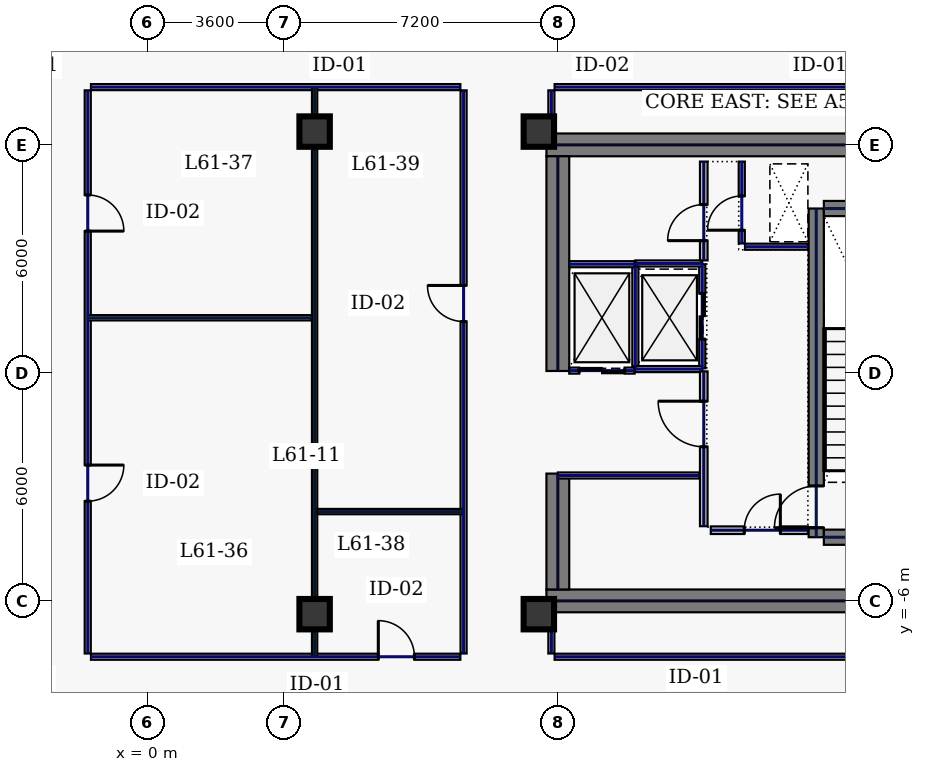
"""IFC4 building model, lengths in metres.
Left out: names, types, materials, properties, quantities, classifications, styles, units other than length and angle.
Written with IfcOpenShell. Run it as: python <this file> out.ifc"""

import sys

from ifc_helpers import new_model, si_unit, direction, frame, frame_2d, origin, origin_2d, place, context, subcontext, project, spatial, rectangle, hollow_rectangle, extrude, element, fill, save


model = new_model("IFC4")
c1 = context("Model", 3, precision=1e-05, world=origin(), true_north=direction((0.0, 1.0)))
c2 = subcontext(c1, "Body", "Model", "MODEL_VIEW")
j1 = project(units=[si_unit("LENGTHUNIT", "METRE"), si_unit("PLANEANGLEUNIT", "RADIAN")], contexts=[c1])
p1 = place(None, origin())
s1 = spatial("IfcSite", under=j1, at=p1, CompositionType="ELEMENT")
p2 = place(p1, origin())
s2 = spatial("IfcBuilding", under=s1, at=p2, CompositionType="ELEMENT")
p3 = place(p2, frame((0.0, 0.0, 263.0)))
s3 = spatial("IfcBuildingStorey", under=s2, at=p3, CompositionType="ELEMENT", Elevation=263.0)
for number, where, z_axis, x_axis in (
    (1, (10.5, 6.0, 0.0), (0.0, 0.0, 1.0), (1.0, 0.0, 0.0)),
    (2, (10.5, -6.0, 0.0), (0.0, 0.0, 1.0), (1.0, 0.0, 0.0)),
):
    element("IfcWall", number, at=place(p3, frame(where, z_axis=z_axis, x_axis=x_axis)), inside=s3, PredefinedType="SHEAR", context=c2, shape_type="SweptSolid", body=[
        extrude(rectangle(XDim=11.5, YDim=0.6, at=frame_2d((5.75, 0.0))), origin(), (0.0, 0.0, 1.0), 3.74),
    ])
p4 = place(p3, frame((10.8, -5.7, 0.0), z_axis=(0.0, 0.0, 1.0), x_axis=(0.0, 1.0, 0.0)))
e3 = element("IfcWall", 3, at=p4, inside=s3, PredefinedType="SHEAR", context=c2, shape_type="SweptSolid", body=[
    extrude(rectangle(XDim=3.05, YDim=0.6, at=frame_2d((1.525, 0.0))), origin(), (0.0, 0.0, 1.0), 3.74),
])
p5 = place(p3, frame((10.8, 0.05, 0.0), z_axis=(0.0, 0.0, 1.0), x_axis=(0.0, 1.0, 0.0)))
e4 = element("IfcWall", 4, at=p5, inside=s3, PredefinedType="SHEAR", context=c2, shape_type="SweptSolid", body=[
    extrude(rectangle(XDim=5.65, YDim=0.6, at=frame_2d((2.825, 0.0))), origin(), (0.0, 0.0, 1.0), 3.74),
])
p6 = place(p3, frame((17.6, -4.325, 0.0), z_axis=(0.0, 0.0, 1.0), x_axis=(0.0, 1.0, 0.0)))
e5 = element("IfcWall", 5, at=p6, inside=s3, PredefinedType="SHEAR", context=c2, shape_type="SweptSolid", body=[
    extrude(rectangle(XDim=8.65, YDim=0.4, at=frame_2d((4.325, 0.0))), origin(), (0.0, 0.0, 1.0), 3.74),
])
p7 = place(p6, frame((0.25, 0.0, 0.0)))
e6 = element("IfcOpeningElement", 6, at=p7, cuts=e5, PredefinedType="OPENING", context=c2, shape_type="SweptSolid", body=[
    extrude(rectangle(XDim=1.1, YDim=2.2, at=frame_2d((0.55, 1.1))), frame((0.0, 0.21, 0.0), z_axis=(0.0, -1.0, 0.0), x_axis=(1.0, 0.0, 0.0)), (0.0, 0.0, 1.0), 0.42),
])
for number, where, z_axis, x_axis in (
    (7, (17.8, -4.325, 0.0), (0.0, 0.0, 1.0), (1.0, 0.0, 0.0)),
    (8, (17.8, 4.325, 0.0), (0.0, 0.0, 1.0), (1.0, 0.0, 0.0)),
):
    element("IfcWall", number, at=place(p3, frame(where, z_axis=z_axis, x_axis=x_axis)), inside=s3, PredefinedType="SHEAR", context=c2, shape_type="SweptSolid", body=[
        extrude(rectangle(XDim=3.4, YDim=0.4, at=frame_2d((1.7, 0.0))), origin(), (0.0, 0.0, 1.0), 3.74),
    ])
for number, where, z_axis, x_axis in (
    (9, (10.3, -6.35, 0.0), (0.0, 0.0, 1.0), (1.0, 0.0, 0.0)),
    (10, (10.3, 6.35, 0.0), (0.0, 0.0, 1.0), (1.0, 0.0, 0.0)),
    (11, (4.4, -6.35, 0.0), (0.0, 0.0, 1.0), (1.0, 0.0, 0.0)),
    (12, (4.4, 6.35, 0.0), (0.0, 0.0, 1.0), (1.0, 0.0, 0.0)),
):
    element("IfcColumn", number, at=place(p3, frame(where, z_axis=z_axis, x_axis=x_axis)), inside=s3, PredefinedType="COLUMN", context=c2, shape_type="SweptSolid", body=[
        extrude(hollow_rectangle(XDim=0.8, YDim=0.8, WallThickness=0.036, at=origin_2d()), origin(), (0.0, 0.0, 1.0), 3.74),
    ])
p8 = place(p3, frame((14.6, 0.12, 0.0), z_axis=(0.0, 0.0, 1.0), x_axis=(0.0, 1.0, 0.0)))
e13 = element("IfcWall", 13, at=p8, inside=s3, PredefinedType="PARTITIONING", context=c2, shape_type="SweptSolid", body=[
    extrude(rectangle(XDim=2.74, YDim=0.16, at=frame_2d((1.37, 0.0))), origin(), (0.0, 0.0, 1.0), 3.74),
])
p9 = place(p8, frame((0.77, 0.0, 0.0)))
e14 = element("IfcOpeningElement", 14, at=p9, cuts=e13, PredefinedType="OPENING", context=c2, shape_type="SweptSolid", body=[
    extrude(rectangle(XDim=1.2, YDim=2.2, at=frame_2d((0.6, 1.1))), frame((0.0, 0.09, 0.0), z_axis=(0.0, -1.0, 0.0), x_axis=(1.0, 0.0, 0.0)), (0.0, 0.0, 1.0), 0.18),
])
for number, where, z_axis, x_axis in (
    (15, (12.84, 0.1, 0.0), (0.0, 0.0, 1.0), (1.0, 0.0, 0.0)),
    (16, (12.84, 2.88, 0.0), (0.0, 0.0, 1.0), (1.0, 0.0, 0.0)),
):
    element("IfcWall", number, at=place(p3, frame(where, z_axis=z_axis, x_axis=x_axis)), inside=s3, PredefinedType="PARTITIONING", context=c2, shape_type="SweptSolid", body=[
        extrude(rectangle(XDim=1.76, YDim=0.16, at=frame_2d((0.88, 0.0))), origin(), (0.0, 0.0, 1.0), 3.74),
    ])
p10 = place(p3, frame((12.84, 0.18, 0.0), z_axis=(0.0, 0.0, 1.0), x_axis=(0.0, 1.0, 0.0)))
e17 = element("IfcWall", 17, at=p10, inside=s3, PredefinedType="PARTITIONING", context=c2, shape_type="SweptSolid", body=[
    extrude(rectangle(XDim=2.62, YDim=0.16, at=frame_2d((1.31, 0.0))), origin(), (0.0, 0.0, 1.0), 3.74),
])
p11 = place(p3, frame((11.1, 0.06, 0.0), z_axis=(0.0, 0.0, 1.0), x_axis=(1.0, 0.0, 0.0)))
e18 = element("IfcWall", 18, at=p11, inside=s3, PredefinedType="PARTITIONING", context=c2, shape_type="SweptSolid", body=[
    extrude(rectangle(XDim=1.72, YDim=0.16, at=frame_2d((0.86, 0.0))), origin(), (0.0, 0.0, 1.0), 3.74),
])
p12 = place(p11, frame((0.26, 0.0, 0.0)))
e19 = element("IfcOpeningElement", 19, at=p12, cuts=e18, PredefinedType="OPENING", context=c2, shape_type="SweptSolid", body=[
    extrude(rectangle(XDim=1.2, YDim=2.2, at=frame_2d((0.6, 1.1))), frame((0.0, 0.09, 0.0), z_axis=(0.0, -1.0, 0.0), x_axis=(1.0, 0.0, 0.0)), (0.0, 0.0, 1.0), 0.18),
])
p13 = place(p3, frame((11.1, 2.86, 0.0), z_axis=(0.0, 0.0, 1.0), x_axis=(1.0, 0.0, 0.0)))
e20 = element("IfcWall", 20, at=p13, inside=s3, PredefinedType="PARTITIONING", context=c2, shape_type="SweptSolid", body=[
    extrude(rectangle(XDim=1.72, YDim=0.16, at=frame_2d((0.86, 0.0))), origin(), (0.0, 0.0, 1.0), 3.74),
])
p14 = place(p3, frame((15.64, 3.405, 0.0), z_axis=(0.0, 0.0, 1.0), x_axis=(0.0, 1.0, 0.0)))
e21 = element("IfcWall", 21, at=p14, inside=s3, PredefinedType="PARTITIONING", context=c2, shape_type="SweptSolid", body=[
    extrude(rectangle(XDim=2.155, YDim=0.16, at=frame_2d((1.078, 0.0))), origin(), (0.0, 0.0, 1.0), 3.74),
])
p15 = place(p14, frame((0.35, 0.0, 0.0)))
e22 = element("IfcOpeningElement", 22, at=p15, cuts=e21, PredefinedType="OPENING", context=c2, shape_type="SweptSolid", body=[
    extrude(rectangle(XDim=0.9, YDim=2.2, at=frame_2d((0.45, 1.1))), frame((0.0, 0.09, 0.0), z_axis=(0.0, -1.0, 0.0), x_axis=(1.0, 0.0, 0.0)), (0.0, 0.0, 1.0), 0.18),
])
p16 = place(p3, frame((15.725, 3.32, 0.0), z_axis=(0.0, 0.0, 1.0), x_axis=(1.0, 0.0, 0.0)))
e23 = element("IfcWall", 23, at=p16, inside=s3, PredefinedType="PARTITIONING", context=c2, shape_type="SweptSolid", body=[
    extrude(rectangle(XDim=1.655, YDim=0.16, at=frame_2d((0.827, 0.0))), origin(), (0.0, 0.0, 1.0), 3.74),
])
p17 = place(p3, frame((14.825, -4.14, 0.0), z_axis=(0.0, 0.0, 1.0), x_axis=(1.0, 0.0, 0.0)))
e24 = element("IfcWall", 24, at=p17, inside=s3, PredefinedType="SOLIDWALL", context=c2, shape_type="SweptSolid", body=[
    extrude(rectangle(XDim=2.555, YDim=0.2, at=frame_2d((1.277, 0.0))), origin(), (0.0, 0.0, 1.0), 3.74),
])
p18 = place(p17, frame((0.88, 0.0, 0.0)))
e25 = element("IfcOpeningElement", 25, at=p18, cuts=e24, PredefinedType="OPENING", context=c2, shape_type="SweptSolid", body=[
    extrude(rectangle(XDim=0.95, YDim=2.2, at=frame_2d((0.475, 1.1))), frame((0.0, 0.11, 0.0), z_axis=(0.0, -1.0, 0.0), x_axis=(1.0, 0.0, 0.0)), (0.0, 0.0, 1.0), 0.22),
])
p19 = place(p3, frame((10.8, -2.7, 0.0), z_axis=(0.0, 0.0, 1.0), x_axis=(1.0, 0.0, 0.0)))
e26 = element("IfcWall", 26, at=p19, inside=s3, PredefinedType="PARTITIONING", context=c2, shape_type="SweptSolid", body=[
    extrude(rectangle(XDim=3.735, YDim=0.16, at=frame_2d((1.867, 0.0))), origin(), (0.0, 0.0, 1.0), 3.74),
])
p20 = place(p3, frame((14.64, 2.96, 0.0), z_axis=(0.0, 0.0, 1.0), x_axis=(0.0, 1.0, 0.0)))
e27 = element("IfcWall", 27, at=p20, inside=s3, PredefinedType="SOLIDWALL", context=c2, shape_type="SweptSolid", body=[
    extrude(rectangle(XDim=2.6, YDim=0.2, at=frame_2d((1.3, 0.0))), origin(), (0.0, 0.0, 1.0), 3.74),
])
p21 = place(p20, frame((0.52, 0.0, 0.0)))
e28 = element("IfcOpeningElement", 28, at=p21, cuts=e27, PredefinedType="OPENING", context=c2, shape_type="SweptSolid", body=[
    extrude(rectangle(XDim=0.95, YDim=2.2, at=frame_2d((0.475, 1.1))), frame((0.0, 0.11, 0.0), z_axis=(0.0, -1.0, 0.0), x_axis=(1.0, 0.0, 0.0)), (0.0, 0.0, 1.0), 0.22),
])
p22 = place(p3, frame((14.64, -4.035, 0.0), z_axis=(0.0, 0.0, 1.0), x_axis=(0.0, 1.0, 0.0)))
e29 = element("IfcWall", 29, at=p22, inside=s3, PredefinedType="SOLIDWALL", context=c2, shape_type="SweptSolid", body=[
    extrude(rectangle(XDim=4.075, YDim=0.2, at=frame_2d((2.038, 0.0))), origin(), (0.0, 0.0, 1.0), 3.74),
])
p23 = place(p22, frame((2.09, 0.0, 0.0)))
e30 = element("IfcOpeningElement", 30, at=p23, cuts=e29, PredefinedType="OPENING", context=c2, shape_type="SweptSolid", body=[
    extrude(rectangle(XDim=1.2, YDim=2.2, at=frame_2d((0.6, 1.1))), frame((0.0, 0.11, 0.0), z_axis=(0.0, -1.0, 0.0), x_axis=(1.0, 0.0, 0.0)), (0.0, 0.0, 1.0), 0.22),
])
p24 = place(p3, frame((22.585, 7.52, 0.0), z_axis=(0.0, 0.0, 1.0), x_axis=(-1.0, 0.0, 0.0)))
e31 = element("IfcWall", 31, at=p24, inside=s3, PredefinedType="PARTITIONING", context=c2, shape_type="SweptSolid", body=[
    extrude(rectangle(XDim=11.87, YDim=0.16, at=frame_2d((5.935, 0.0))), origin(), (0.0, 0.0, 1.0), 3.74),
])
p25 = place(p3, frame((10.63, 7.435, 0.0), z_axis=(0.0, 0.0, 1.0), x_axis=(0.0, -1.0, 0.0)))
e32 = element("IfcWall", 32, at=p25, inside=s3, PredefinedType="PARTITIONING", context=c2, shape_type="SweptSolid", body=[
    extrude(rectangle(XDim=1.015, YDim=0.16, at=frame_2d((0.508, 0.0))), origin(), (0.0, 0.0, 1.0), 3.74),
])
p26 = place(p3, frame((10.63, -6.42, 0.0), z_axis=(0.0, 0.0, 1.0), x_axis=(0.0, -1.0, 0.0)))
e33 = element("IfcWall", 33, at=p26, inside=s3, PredefinedType="PARTITIONING", context=c2, shape_type="SweptSolid", body=[
    extrude(rectangle(XDim=0.965, YDim=0.16, at=frame_2d((0.482, 0.0))), origin(), (0.0, 0.0, 1.0), 3.74),
])
p27 = place(p3, frame((10.715, -7.47, 0.0), z_axis=(0.0, 0.0, 1.0), x_axis=(1.0, 0.0, 0.0)))
e34 = element("IfcWall", 34, at=p27, inside=s3, PredefinedType="PARTITIONING", context=c2, shape_type="SweptSolid", body=[
    extrude(rectangle(XDim=11.87, YDim=0.16, at=frame_2d((5.935, 0.0))), origin(), (0.0, 0.0, 1.0), 3.74),
])
p28 = place(p3, frame((8.235, 7.52, 0.0), z_axis=(0.0, 0.0, 1.0), x_axis=(-1.0, 0.0, 0.0)))
e35 = element("IfcWall", 35, at=p28, inside=s3, PredefinedType="PARTITIONING", context=c2, shape_type="SweptSolid", body=[
    extrude(rectangle(XDim=9.72, YDim=0.16, at=frame_2d((4.86, 0.0))), origin(), (0.0, 0.0, 1.0), 3.74),
])
p29 = place(p3, frame((-1.57, 7.435, 0.0), z_axis=(0.0, 0.0, 1.0), x_axis=(0.0, -1.0, 0.0)))
e36 = element("IfcWall", 36, at=p29, inside=s3, PredefinedType="PARTITIONING", context=c2, shape_type="SweptSolid", body=[
    extrude(rectangle(XDim=14.82, YDim=0.16, at=frame_2d((7.41, 0.0))), origin(), (0.0, 0.0, 1.0), 3.74),
])
p30 = place(p29, frame((9.861, 0.0, 0.0)))
e37 = element("IfcOpeningElement", 37, at=p30, cuts=e36, PredefinedType="OPENING", context=c2, shape_type="SweptSolid", body=[
    extrude(rectangle(XDim=0.95, YDim=2.2, at=frame_2d((0.475, 1.1))), frame((0.0, 0.09, 0.0), z_axis=(0.0, -1.0, 0.0), x_axis=(1.0, 0.0, 0.0)), (0.0, 0.0, 1.0), 0.18),
])
p31 = place(p29, frame((2.754, 0.0, 0.0)))
e38 = element("IfcOpeningElement", 38, at=p31, cuts=e36, PredefinedType="OPENING", context=c2, shape_type="SweptSolid", body=[
    extrude(rectangle(XDim=0.95, YDim=2.2, at=frame_2d((0.475, 1.1))), frame((0.0, 0.09, 0.0), z_axis=(0.0, -1.0, 0.0), x_axis=(1.0, 0.0, 0.0)), (0.0, 0.0, 1.0), 0.18),
])
p32 = place(p3, frame((-1.485, -7.47, 0.0), z_axis=(0.0, 0.0, 1.0), x_axis=(1.0, 0.0, 0.0)))
e39 = element("IfcWall", 39, at=p32, inside=s3, PredefinedType="PARTITIONING", context=c2, shape_type="SweptSolid", body=[
    extrude(rectangle(XDim=9.72, YDim=0.16, at=frame_2d((4.86, 0.0))), origin(), (0.0, 0.0, 1.0), 3.74),
])
p33 = place(p32, frame((7.561, 0.0, 0.0)))
e40 = element("IfcOpeningElement", 40, at=p33, cuts=e39, PredefinedType="OPENING", context=c2, shape_type="SweptSolid", body=[
    extrude(rectangle(XDim=0.95, YDim=2.2, at=frame_2d((0.475, 1.1))), frame((0.0, 0.09, 0.0), z_axis=(0.0, -1.0, 0.0), x_axis=(1.0, 0.0, 0.0)), (0.0, 0.0, 1.0), 0.18),
])
p34 = place(p3, frame((8.32, -7.385, 0.0), z_axis=(0.0, 0.0, 1.0), x_axis=(0.0, 1.0, 0.0)))
e41 = element("IfcWall", 41, at=p34, inside=s3, PredefinedType="PARTITIONING", context=c2, shape_type="SweptSolid", body=[
    extrude(rectangle(XDim=14.82, YDim=0.16, at=frame_2d((7.41, 0.0))), origin(), (0.0, 0.0, 1.0), 3.74),
])
p35 = place(p34, frame((8.736, 0.0, 0.0)))
e42 = element("IfcOpeningElement", 42, at=p35, cuts=e41, PredefinedType="OPENING", context=c2, shape_type="SweptSolid", body=[
    extrude(rectangle(XDim=0.95, YDim=2.2, at=frame_2d((0.475, 1.1))), frame((0.0, 0.09, 0.0), z_axis=(0.0, -1.0, 0.0), x_axis=(1.0, 0.0, 0.0)), (0.0, 0.0, 1.0), 0.18),
])
p36 = place(p3, frame((4.4, -7.465, 0.0), z_axis=(0.0, 0.0, 1.0), x_axis=(0.0, 1.0, 0.0)))
e43 = element("IfcWall", 43, at=p36, inside=s3, PredefinedType="PARTITIONING", context=c2, shape_type="SweptSolid", body=[
    extrude(rectangle(XDim=14.98, YDim=0.14, at=frame_2d((7.49, 0.0))), origin(), (0.0, 0.0, 1.0), 3.035),
])
p37 = place(p3, frame((-1.565, 1.45, 0.0), z_axis=(0.0, 0.0, 1.0), x_axis=(1.0, 0.0, 0.0)))
e44 = element("IfcWall", 44, at=p37, inside=s3, PredefinedType="PARTITIONING", context=c2, shape_type="SweptSolid", body=[
    extrude(rectangle(XDim=5.89, YDim=0.14, at=frame_2d((2.945, 0.0))), origin(), (0.0, 0.0, 1.0), 3.74),
])
p38 = place(p3, frame((4.475, -3.65, 0.0), z_axis=(0.0, 0.0, 1.0), x_axis=(1.0, 0.0, 0.0)))
e45 = element("IfcWall", 45, at=p38, inside=s3, PredefinedType="PARTITIONING", context=c2, shape_type="SweptSolid", body=[
    extrude(rectangle(XDim=3.84, YDim=0.14, at=frame_2d((1.92, 0.0))), origin(), (0.0, 0.0, 1.0), 3.74),
])
p39 = place(p7, origin())
e46 = element("IfcDoor", 46, at=p39, inside=s3, OperationType="SINGLE_SWING_LEFT", PredefinedType="DOOR", context=c2, shape_type="SweptSolid", body=[
    extrude(rectangle(XDim=1.1, YDim=2.2, at=frame_2d((0.55, 1.1))), frame((0.0, 0.025, 0.0), z_axis=(0.0, -1.0, 0.0), x_axis=(1.0, 0.0, 0.0)), (0.0, 0.0, 1.0), 0.05),
])
fill(e6, e46)
p40 = place(p9, origin())
e47 = element("IfcDoor", 47, at=p40, inside=s3, OperationType="SLIDING_TO_LEFT", PredefinedType="DOOR", context=c2, shape_type="SweptSolid", body=[
    extrude(rectangle(XDim=1.2, YDim=2.2, at=frame_2d((0.6, 1.1))), frame((0.0, 0.025, 0.0), z_axis=(0.0, -1.0, 0.0), x_axis=(1.0, 0.0, 0.0)), (0.0, 0.0, 1.0), 0.05),
])
fill(e14, e47)
p41 = place(p12, origin())
e48 = element("IfcDoor", 48, at=p41, inside=s3, OperationType="SLIDING_TO_LEFT", PredefinedType="DOOR", context=c2, shape_type="SweptSolid", body=[
    extrude(rectangle(XDim=1.2, YDim=2.2, at=frame_2d((0.6, 1.1))), frame((0.0, 0.025, 0.0), z_axis=(0.0, -1.0, 0.0), x_axis=(1.0, 0.0, 0.0)), (0.0, 0.0, 1.0), 0.05),
])
fill(e19, e48)
p42 = place(p15, origin())
e49 = element("IfcDoor", 49, at=p42, inside=s3, OperationType="SINGLE_SWING_LEFT", PredefinedType="DOOR", context=c2, shape_type="SweptSolid", body=[
    extrude(rectangle(XDim=0.9, YDim=2.2, at=frame_2d((0.45, 1.1))), frame((0.0, 0.025, 0.0), z_axis=(0.0, -1.0, 0.0), x_axis=(1.0, 0.0, 0.0)), (0.0, 0.0, 1.0), 0.05),
])
fill(e22, e49)
p43 = place(p18, origin())
e50 = element("IfcDoor", 50, at=p43, inside=s3, OperationType="SINGLE_SWING_RIGHT", PredefinedType="DOOR", context=c2, shape_type="SweptSolid", body=[
    extrude(rectangle(XDim=0.95, YDim=2.2, at=frame_2d((0.475, 1.1))), frame((0.0, 0.025, 0.0), z_axis=(0.0, -1.0, 0.0), x_axis=(1.0, 0.0, 0.0)), (0.0, 0.0, 1.0), 0.05),
])
fill(e25, e50)
p44 = place(p21, origin())
e51 = element("IfcDoor", 51, at=p44, inside=s3, OperationType="SINGLE_SWING_LEFT", PredefinedType="DOOR", context=c2, shape_type="SweptSolid", body=[
    extrude(rectangle(XDim=0.95, YDim=2.2, at=frame_2d((0.475, 1.1))), frame((0.0, 0.025, 0.0), z_axis=(0.0, -1.0, 0.0), x_axis=(1.0, 0.0, 0.0)), (0.0, 0.0, 1.0), 0.05),
])
fill(e28, e51)
p45 = place(p23, origin())
e52 = element("IfcDoor", 52, at=p45, inside=s3, OperationType="SINGLE_SWING_RIGHT", PredefinedType="DOOR", context=c2, shape_type="SweptSolid", body=[
    extrude(rectangle(XDim=1.2, YDim=2.2, at=frame_2d((0.6, 1.1))), frame((0.0, 0.025, 0.0), z_axis=(0.0, -1.0, 0.0), x_axis=(1.0, 0.0, 0.0)), (0.0, 0.0, 1.0), 0.05),
])
fill(e30, e52)
p46 = place(p30, origin())
e53 = element("IfcDoor", 53, at=p46, inside=s3, OperationType="SINGLE_SWING_LEFT", PredefinedType="DOOR", context=c2, shape_type="SweptSolid", body=[
    extrude(rectangle(XDim=0.95, YDim=2.2, at=frame_2d((0.475, 1.1))), frame((0.0, 0.025, 0.0), z_axis=(0.0, -1.0, 0.0), x_axis=(1.0, 0.0, 0.0)), (0.0, 0.0, 1.0), 0.05),
])
fill(e37, e53)
p47 = place(p31, origin())
e54 = element("IfcDoor", 54, at=p47, inside=s3, OperationType="SINGLE_SWING_RIGHT", PredefinedType="DOOR", context=c2, shape_type="SweptSolid", body=[
    extrude(rectangle(XDim=0.95, YDim=2.2, at=frame_2d((0.475, 1.1))), frame((0.0, 0.025, 0.0), z_axis=(0.0, -1.0, 0.0), x_axis=(1.0, 0.0, 0.0)), (0.0, 0.0, 1.0), 0.05),
])
fill(e38, e54)
p48 = place(p33, origin())
e55 = element("IfcDoor", 55, at=p48, inside=s3, OperationType="SINGLE_SWING_LEFT", PredefinedType="DOOR", context=c2, shape_type="SweptSolid", body=[
    extrude(rectangle(XDim=0.95, YDim=2.2, at=frame_2d((0.475, 1.1))), frame((0.0, 0.025, 0.0), z_axis=(0.0, -1.0, 0.0), x_axis=(1.0, 0.0, 0.0)), (0.0, 0.0, 1.0), 0.05),
])
fill(e40, e55)
p49 = place(p35, origin())
e56 = element("IfcDoor", 56, at=p49, inside=s3, OperationType="SINGLE_SWING_RIGHT", PredefinedType="DOOR", context=c2, shape_type="SweptSolid", body=[
    extrude(rectangle(XDim=0.95, YDim=2.2, at=frame_2d((0.475, 1.1))), frame((0.0, 0.025, 0.0), z_axis=(0.0, -1.0, 0.0), x_axis=(1.0, 0.0, 0.0)), (0.0, 0.0, 1.0), 0.05),
])
fill(e42, e56)
save(model, sys.argv[1])
